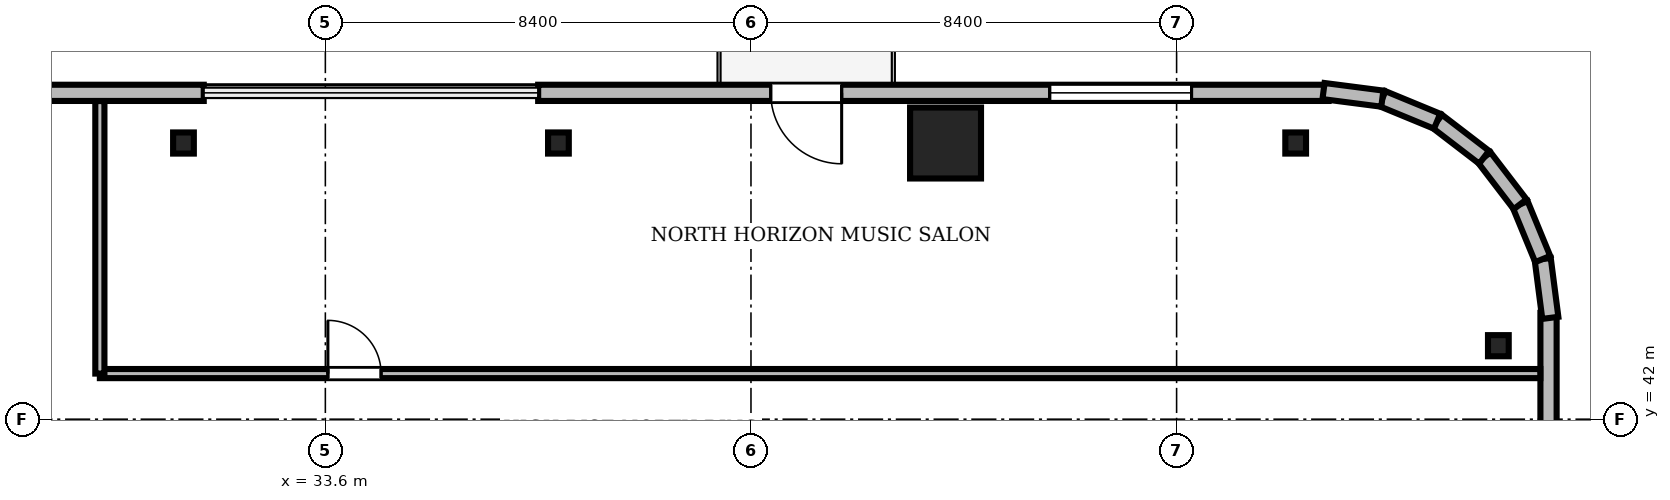
"""IFC4 building model, lengths in metres.
Left out: names, types, materials, properties, quantities, classifications, styles, units other than length and angle.
Written with IfcOpenShell. Run it as: python <this file> out.ifc"""

import sys

from ifc_helpers import new_model, si_unit, direction, frame, frame_2d, origin, origin_2d, place, context, subcontext, project, spatial, rectangle, i_section, extrude, source, transform, mapped, element, fill, save


model = new_model("IFC4")
c1 = context("Model", 3, precision=1e-05, world=origin(), true_north=direction((0.0, 1.0)))
c2 = subcontext(c1, "Body", "Model", "MODEL_VIEW")
j1 = project(units=[si_unit("LENGTHUNIT", "METRE"), si_unit("PLANEANGLEUNIT", "RADIAN")], contexts=[c1])
p1 = place(None, origin())
s1 = spatial("IfcSite", under=j1, at=p1, CompositionType="ELEMENT")
p2 = place(p1, origin())
s2 = spatial("IfcBuilding", under=s1, at=p2, CompositionType="ELEMENT")
p3 = place(p2, frame((0.0, 0.0, 181.0)))
s3 = spatial("IfcBuildingStorey", under=s2, at=p3, CompositionType="ELEMENT", Elevation=181.0)
m1 = source(origin(), c2, "Body", "SweptSolid", [
    extrude(rectangle(XDim=1.4, YDim=1.4, at=origin_2d()), origin(), (0.0, 0.0, 1.0), 3.58),
])
p4 = place(p3, frame((45.84, 47.45, 0.0), z_axis=(0.0, 0.0, 1.0), x_axis=(1.0, 0.0, 0.0)))
e1 = element("IfcColumn", 1, at=p4, inside=s3, PredefinedType="COLUMN", context=c2, shape_type="MappedRepresentation", body=[
    mapped(m1, transform((0.0, 0.0, 0.0), scale=1.0)),
])
m2 = source(origin(), c2, "Body", "SweptSolid", [
    extrude(i_section(OverallWidth=0.409, OverallDepth=0.417, WebThickness=0.021, FlangeThickness=0.033, FilletRadius=0.015, at=origin_2d()), origin(), (0.0, 0.0, 1.0), 3.58),
])
for number, where, z_axis, x_axis in (
    (2, (56.75, 43.45, 0.0), (0.0, 0.0, 1.0), (1.0, 0.0, 0.0)),
    (3, (52.75, 47.45, 0.0), (0.0, 0.0, 1.0), (1.0, 0.0, 0.0)),
    (4, (38.2, 47.45, 0.0), (0.0, 0.0, 1.0), (1.0, 0.0, 0.0)),
    (5, (30.8, 47.45, 0.0), (0.0, 0.0, 1.0), (1.0, 0.0, 0.0)),
):
    element("IfcColumn", number, at=place(p3, frame(where, z_axis=z_axis, x_axis=x_axis)), inside=s3, PredefinedType="COLUMN", context=c2, shape_type="MappedRepresentation", body=[
        mapped(m2, transform((0.0, 0.0, 0.0), scale=1.0)),
    ])
m3 = source(origin(), c2, "Body", "SweptSolid", [
    extrude(rectangle(XDim=15.6, YDim=0.32, at=frame_2d((7.8, 0.0))), origin(), (0.0, 0.0, 1.0), 3.58),
])
p5 = place(p3, frame((53.4, 48.44, 0.0), z_axis=(0.0, 0.0, 1.0), x_axis=(-1.0, 0.0, 0.0)))
e6 = element("IfcWall", 6, at=p5, inside=s3, PredefinedType="SOLIDWALL", context=c2, shape_type="MappedRepresentation", body=[
    mapped(m3, transform((0.0, 0.0, 0.0), scale=1.0)),
])
m4 = source(origin(), c2, "Body", "SweptSolid", [
    extrude(rectangle(XDim=1.4, YDim=2.3, at=frame_2d((0.7, 1.15))), frame((0.0, 0.17, 0.0), z_axis=(0.0, -1.0, 0.0), x_axis=(1.0, 0.0, 0.0)), (0.0, 0.0, 1.0), 0.34),
])
p6 = place(p5, frame((9.61, 0.0, 0.0)))
e7 = element("IfcOpeningElement", 7, at=p6, cuts=e6, PredefinedType="OPENING", context=c2, shape_type="MappedRepresentation", body=[
    mapped(m4, transform((0.0, 0.0, 0.0), scale=1.0)),
])
m5 = source(origin(), c2, "Body", "SweptSolid", [
    extrude(rectangle(XDim=2.8, YDim=2.4, at=frame_2d((1.4, 1.2))), frame((0.0, 0.17, 0.0), z_axis=(0.0, -1.0, 0.0), x_axis=(1.0, 0.0, 0.0)), (0.0, 0.0, 1.0), 0.34),
])
p7 = place(p5, frame((2.705, 0.0, 0.72)))
e8 = element("IfcOpeningElement", 8, at=p7, cuts=e6, PredefinedType="OPENING", context=c2, shape_type="MappedRepresentation", body=[
    mapped(m5, transform((0.0, 0.0, 0.0), scale=1.0)),
])
p8 = place(p3, frame((31.2, 48.44, 0.0), z_axis=(0.0, 0.0, 1.0), x_axis=(-1.0, 0.0, 0.0)))
e9 = element("IfcWall", 9, at=p8, inside=s3, PredefinedType="SOLIDWALL", context=c2, shape_type="MappedRepresentation", body=[
    mapped(m3, transform((0.0, 0.0, 0.0), scale=1.0)),
])
p9 = place(p8, frame((10.095, 0.0, 0.72)))
e10 = element("IfcOpeningElement", 10, at=p9, cuts=e9, PredefinedType="OPENING", context=c2, shape_type="MappedRepresentation", body=[
    mapped(m5, transform((0.0, 0.0, 0.0), scale=1.0)),
])
m6 = source(origin(), c2, "Body", "SweptSolid", [
    extrude(rectangle(XDim=15.6, YDim=0.32, at=frame_2d((7.8, 0.0))), origin(), (0.0, 0.0, 1.0), 3.58),
])
p10 = place(p3, frame((57.74, 28.5, 0.0), z_axis=(0.0, 0.0, 1.0), x_axis=(0.0, 1.0, 0.0)))
e11 = element("IfcWall", 11, at=p10, inside=s3, PredefinedType="SOLIDWALL", context=c2, shape_type="MappedRepresentation", body=[
    mapped(m6, transform((0.0, 0.0, 0.0), scale=1.0)),
])
p11 = place(p10, frame((10.095, 0.0, 0.72)))
e12 = element("IfcOpeningElement", 12, at=p11, cuts=e11, PredefinedType="OPENING", context=c2, shape_type="MappedRepresentation", body=[
    mapped(m5, transform((0.0, 0.0, 0.0), scale=1.0)),
])
m7 = source(origin(), c2, "Body", "SweptSolid", [
    extrude(rectangle(XDim=1.17, YDim=0.32, at=frame_2d((0.585, 0.0))), origin(), (0.0, 0.0, 1.0), 3.58),
])
p12 = place(p3, frame((57.776, 44.0, 0.0), z_axis=(0.0, 0.0, 1.0), x_axis=(-0.128295670475, 0.991735963317, 0.0)))
e13 = element("IfcWall", 13, at=p12, inside=s3, PredefinedType="SOLIDWALL", context=c2, shape_type="MappedRepresentation", body=[
    mapped(m7, transform((0.0, 0.0, 0.0), scale=1.0)),
])
m8 = source(origin(), c2, "Body", "SweptSolid", [
    extrude(rectangle(XDim=1.169, YDim=0.32, at=frame_2d((0.584, 0.0))), origin(), (0.0, 0.0, 1.0), 3.58),
])
p13 = place(p3, frame((57.625, 45.16, 0.0), z_axis=(0.0, 0.0, 1.0), x_axis=(-0.381054331552, 0.924552646638, 0.0)))
e14 = element("IfcWall", 14, at=p13, inside=s3, PredefinedType="SOLIDWALL", context=c2, shape_type="MappedRepresentation", body=[
    mapped(m8, transform((0.0, 0.0, 0.0), scale=1.0)),
])
m9 = source(origin(), c2, "Body", "SweptSolid", [
    extrude(rectangle(XDim=1.169, YDim=0.32, at=frame_2d((0.584, 0.0))), origin(), (0.0, 0.0, 1.0), 3.58),
])
p14 = place(p3, frame((57.18, 46.241, 0.0), z_axis=(0.0, 0.0, 1.0), x_axis=(-0.608387696831, 0.793639975269, 0.0)))
e15 = element("IfcWall", 15, at=p14, inside=s3, PredefinedType="SOLIDWALL", context=c2, shape_type="MappedRepresentation", body=[
    mapped(m9, transform((0.0, 0.0, 0.0), scale=1.0)),
])
m10 = source(origin(), c2, "Body", "SweptSolid", [
    extrude(rectangle(XDim=1.169, YDim=0.32, at=frame_2d((0.584, 0.0))), origin(), (0.0, 0.0, 1.0), 3.58),
])
p15 = place(p3, frame((56.469, 47.169, 0.0), z_axis=(0.0, 0.0, 1.0), x_axis=(-0.793663520347, 0.608356981114, 0.0)))
e16 = element("IfcWall", 16, at=p15, inside=s3, PredefinedType="SOLIDWALL", context=c2, shape_type="MappedRepresentation", body=[
    mapped(m10, transform((0.0, 0.0, 0.0), scale=1.0)),
])
p16 = place(p3, frame((55.541, 47.88, 0.0), z_axis=(0.0, 0.0, 1.0), x_axis=(-0.924552646638, 0.381054331552, 0.0)))
e17 = element("IfcWall", 17, at=p16, inside=s3, PredefinedType="SOLIDWALL", context=c2, shape_type="MappedRepresentation", body=[
    mapped(m8, transform((0.0, 0.0, 0.0), scale=1.0)),
])
p17 = place(p3, frame((54.46, 48.325, 0.0), z_axis=(0.0, 0.0, 1.0), x_axis=(-0.991735963317, 0.128295670475, 0.0)))
e18 = element("IfcWall", 18, at=p17, inside=s3, PredefinedType="SOLIDWALL", context=c2, shape_type="MappedRepresentation", body=[
    mapped(m7, transform((0.0, 0.0, 0.0), scale=1.0)),
])
m11 = source(origin(), c2, "Body", "SweptSolid", [
    extrude(rectangle(XDim=28.428, YDim=0.18, at=frame_2d((14.214, 0.0))), origin(), (0.0, 0.0, 1.0), 2.822),
])
p18 = place(p3, frame((29.15, 42.9, 0.0), z_axis=(0.0, 0.0, 1.0), x_axis=(1.0, 0.0, 0.0)))
e19 = element("IfcWall", 19, at=p18, inside=s3, PredefinedType="PARTITIONING", context=c2, shape_type="MappedRepresentation", body=[
    mapped(m11, transform((0.0, 0.0, 0.0), scale=1.0)),
])
m12 = source(origin(), c2, "Body", "SweptSolid", [
    extrude(rectangle(XDim=1.05, YDim=2.2, at=frame_2d((0.525, 1.1))), frame((0.0, 0.1, 0.0), z_axis=(0.0, -1.0, 0.0), x_axis=(1.0, 0.0, 0.0)), (0.0, 0.0, 1.0), 0.2),
])
p19 = place(p18, frame((4.5, 0.0, 0.0)))
e20 = element("IfcOpeningElement", 20, at=p19, cuts=e19, PredefinedType="OPENING", context=c2, shape_type="MappedRepresentation", body=[
    mapped(m12, transform((0.0, 0.0, 0.0), scale=1.0)),
])
m13 = source(origin(), c2, "Body", "SweptSolid", [
    extrude(rectangle(XDim=5.378, YDim=0.18, at=frame_2d((2.689, 0.0))), origin(), (0.0, 0.0, 1.0), 2.822),
])
p20 = place(p3, frame((29.15, 42.9, 0.0), z_axis=(0.0, 0.0, 1.0), x_axis=(0.0, 1.0, 0.0)))
e21 = element("IfcWall", 21, at=p20, inside=s3, PredefinedType="PARTITIONING", context=c2, shape_type="MappedRepresentation", body=[
    mapped(m13, transform((0.0, 0.0, 0.0), scale=1.0)),
])
m14 = source(origin(), c2, "Body", "SweptSolid", [
    extrude(rectangle(XDim=1.4, YDim=2.3, at=frame_2d((0.7, 1.15))), frame((0.0, 0.025, 0.0), z_axis=(0.0, -1.0, 0.0), x_axis=(1.0, 0.0, 0.0)), (0.0, 0.0, 1.0), 0.05),
])
p21 = place(p6, frame((1.4, 0.0, 0.0), z_axis=(0.0, 0.0, 1.0), x_axis=(-1.0, 0.0, 0.0)))
e22 = element("IfcDoor", 22, at=p21, inside=s3, OperationType="DOUBLE_DOOR_SLIDING", PredefinedType="DOOR", context=c2, shape_type="MappedRepresentation", body=[
    mapped(m14, transform((0.0, 0.0, 0.0), scale=1.0)),
])
fill(e7, e22)
m15 = source(origin(), c2, "Body", "SweptSolid", [
    extrude(rectangle(XDim=2.8, YDim=2.4, at=frame_2d((1.4, 1.2))), frame((0.0, 0.03, 0.0), z_axis=(0.0, -1.0, 0.0), x_axis=(1.0, 0.0, 0.0)), (0.0, 0.0, 1.0), 0.06),
])
p22 = place(p7, origin())
e23 = element("IfcWindow", 23, at=p22, inside=s3, PartitioningType="SINGLE_PANEL", PredefinedType="WINDOW", context=c2, shape_type="MappedRepresentation", body=[
    mapped(m15, transform((0.0, 0.0, 0.0), scale=1.0)),
])
fill(e8, e23)
m16 = source(origin(), c2, "Body", "SweptSolid", [
    extrude(rectangle(XDim=1.05, YDim=2.2, at=frame_2d((0.525, 1.1))), frame((0.0, 0.025, 0.0), z_axis=(0.0, -1.0, 0.0), x_axis=(1.0, 0.0, 0.0)), (0.0, 0.0, 1.0), 0.05),
])
p23 = place(p19, origin())
e24 = element("IfcDoor", 24, at=p23, inside=s3, OperationType="SINGLE_SWING_LEFT", PredefinedType="DOOR", context=c2, shape_type="MappedRepresentation", body=[
    mapped(m16, transform((0.0, 0.0, 0.0), scale=1.0)),
])
fill(e20, e24)
save(model, sys.argv[1])
